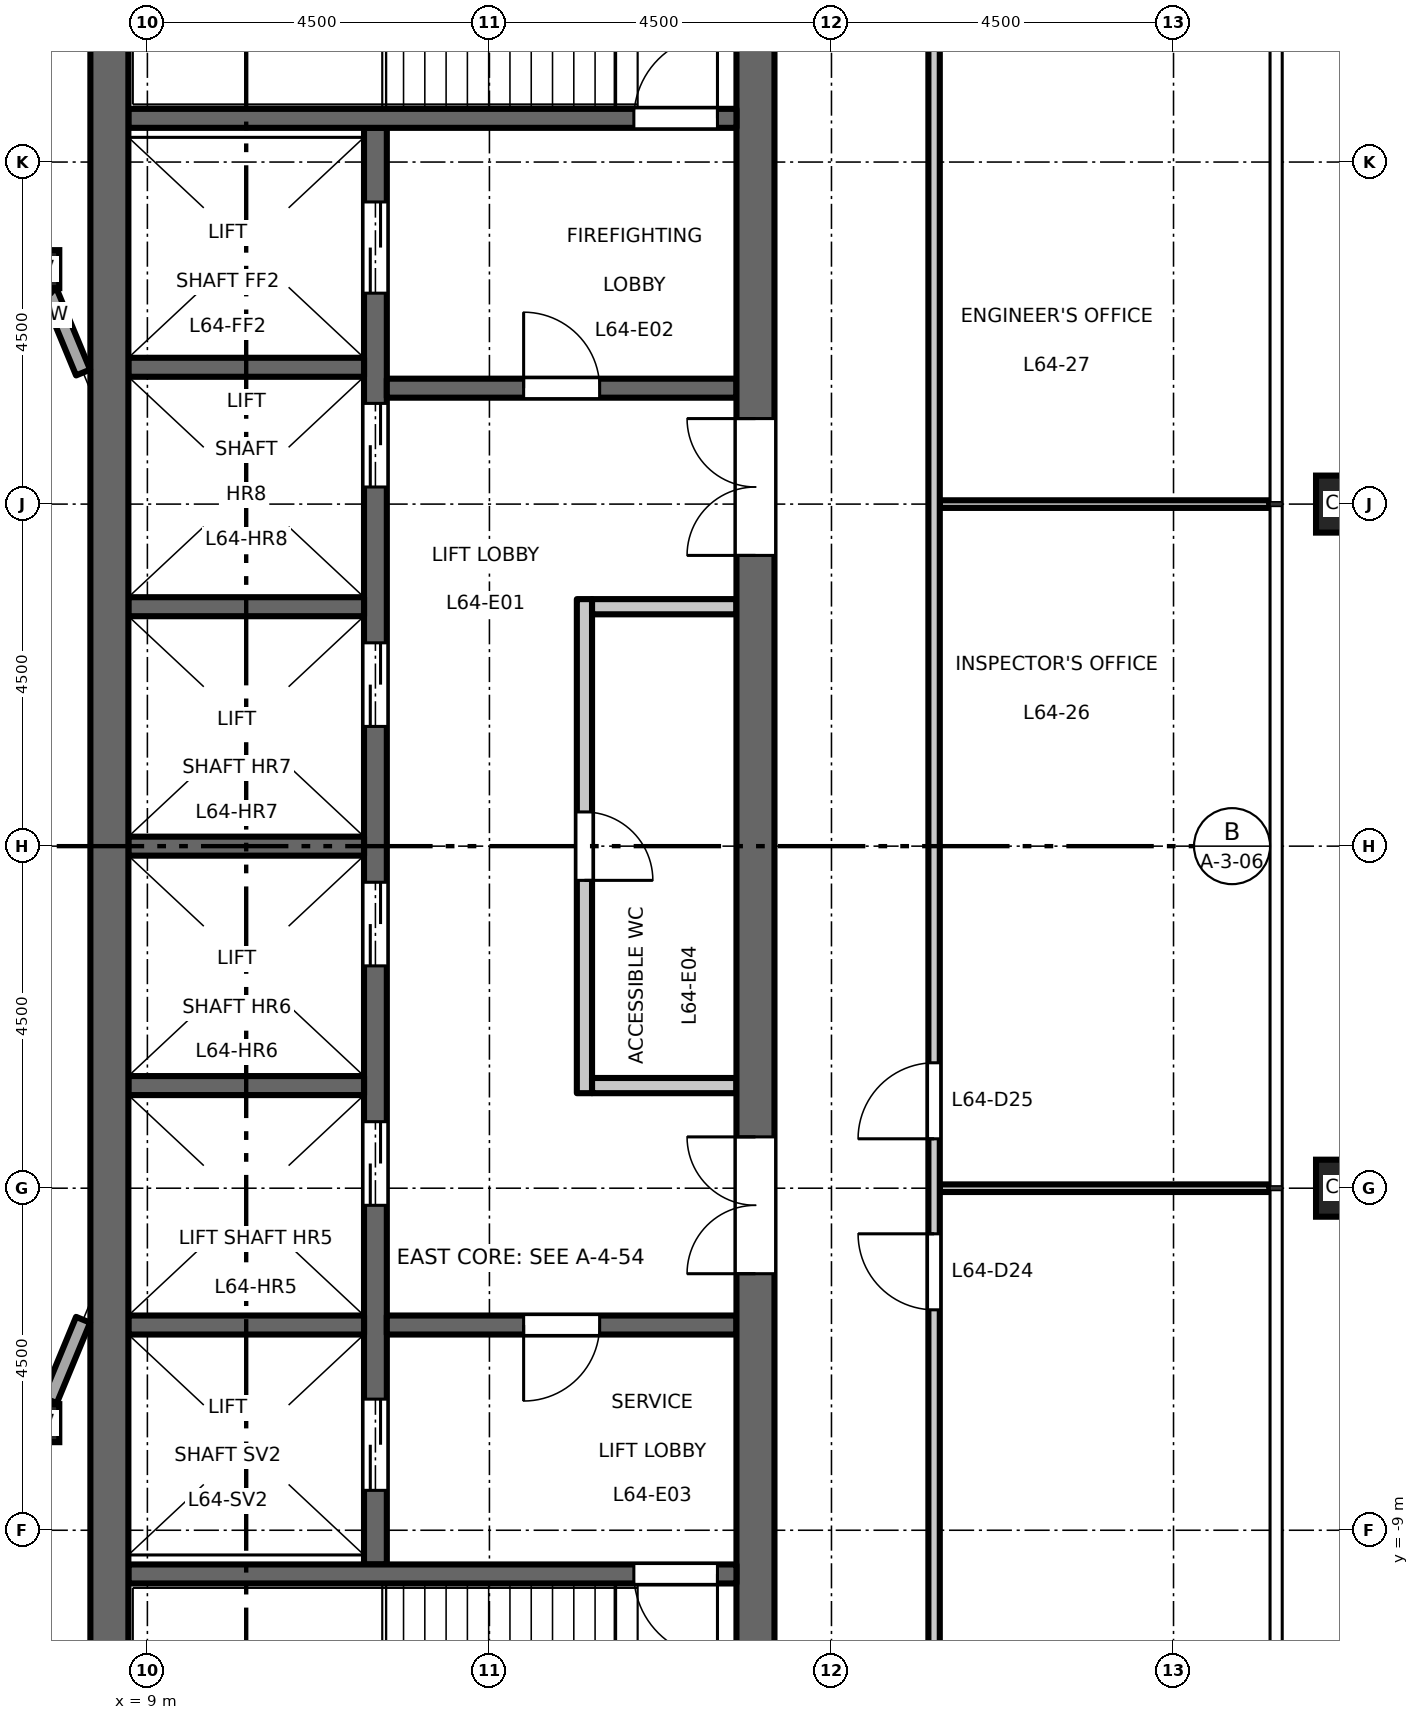
"""IFC4 building model, lengths in metres.
Left out: names, types, materials, properties, quantities, classifications, styles, units other than length and angle.
Written with IfcOpenShell. Run it as: python <this file> out.ifc"""

import sys

from ifc_helpers import new_model, si_unit, direction, frame, frame_2d, origin, origin_2d, place, context, subcontext, project, spatial, rectangle, hollow_rectangle, extrude, element, fill, save


model = new_model("IFC4")
c1 = context("Model", 3, precision=1e-05, world=origin(), true_north=direction((0.0, 1.0)))
c2 = subcontext(c1, "Body", "Model", "MODEL_VIEW")
j1 = project(units=[si_unit("LENGTHUNIT", "METRE"), si_unit("PLANEANGLEUNIT", "RADIAN")], contexts=[c1])
p1 = place(None, origin())
s1 = spatial("IfcSite", under=j1, at=p1, CompositionType="ELEMENT")
p2 = place(p1, origin())
s2 = spatial("IfcBuilding", under=s1, at=p2, CompositionType="ELEMENT")
p3 = place(p2, frame((0.0, 0.0, 298.7)))
s3 = spatial("IfcBuildingStorey", under=s2, at=p3, CompositionType="ELEMENT", Elevation=298.7)
for number, where, z_axis, x_axis in (
    (1, (24.75, -4.5, 0.0), (0.0, 0.0, 1.0), (1.0, 0.0, 0.0)),
    (2, (24.75, 4.5, 0.0), (0.0, 0.0, 1.0), (1.0, 0.0, 0.0)),
):
    element("IfcColumn", number, at=place(p3, frame(where, z_axis=z_axis, x_axis=x_axis)), inside=s3, PredefinedType="COLUMN", context=c2, shape_type="SweptSolid", body=[
        extrude(hollow_rectangle(XDim=0.75, YDim=0.75, WallThickness=0.04, at=origin_2d()), origin(), (0.0, 0.0, 1.0), 4.5),
    ])
for number, where, z_axis, x_axis in (
    (3, (7.591, -7.591, 0.0), (0.0, 0.0, 1.0), (1.0, 0.0, 0.0)),
    (4, (7.591, 7.591, 0.0), (0.0, 0.0, 1.0), (1.0, 0.0, 0.0)),
):
    element("IfcColumn", number, at=place(p3, frame(where, z_axis=z_axis, x_axis=x_axis)), inside=s3, PredefinedType="COLUMN", context=c2, shape_type="SweptSolid", body=[
        extrude(hollow_rectangle(XDim=0.5, YDim=0.5, WallThickness=0.025, at=origin_2d()), origin(), (0.0, 0.0, 1.0), 4.5),
    ])
p4 = place(p3, frame((14.75, -3.25, 0.0), z_axis=(0.0, 0.0, 1.0), x_axis=(0.0, 1.0, 0.0)))
e5 = element("IfcWall", 5, at=p4, inside=s3, PredefinedType="PARTITIONING", context=c2, shape_type="SweptSolid", body=[
    extrude(rectangle(XDim=6.5, YDim=0.2, at=frame_2d((3.25, 0.0))), origin(), (0.0, 0.0, 1.0), 4.35),
])
p5 = place(p4, frame((2.8, 0.0, 0.0)))
e6 = element("IfcOpeningElement", 6, at=p5, cuts=e5, PredefinedType="OPENING", context=c2, shape_type="SweptSolid", body=[
    extrude(rectangle(XDim=0.9, YDim=2.1, at=frame_2d((0.45, 1.05))), frame((0.0, 0.11, 0.0), z_axis=(0.0, -1.0, 0.0), x_axis=(1.0, 0.0, 0.0)), (0.0, 0.0, 1.0), 0.22),
])
for number, where, z_axis, x_axis in (
    (7, (14.85, 3.15, 0.0), (0.0, 0.0, 1.0), (1.0, 0.0, 0.0)),
    (8, (14.85, -3.15, 0.0), (0.0, 0.0, 1.0), (1.0, 0.0, 0.0)),
):
    element("IfcWall", number, at=place(p3, frame(where, z_axis=z_axis, x_axis=x_axis)), inside=s3, PredefinedType="PARTITIONING", context=c2, shape_type="SweptSolid", body=[
        extrude(rectangle(XDim=1.9, YDim=0.2, at=frame_2d((0.95, 0.0))), origin(), (0.0, 0.0, 1.0), 4.35),
    ])
p6 = place(p3, frame((12.0, -9.45, 0.0), z_axis=(0.0, 0.0, 1.0), x_axis=(0.0, 1.0, 0.0)))
e9 = element("IfcWall", 9, at=p6, inside=s3, PredefinedType="SHEAR", context=c2, shape_type="SweptSolid", body=[
    extrude(rectangle(XDim=18.9, YDim=0.3, at=frame_2d((9.45, 0.0))), origin(), (0.0, 0.0, 1.0), 4.35),
])
p7 = place(p6, frame((4.725, 0.0, 0.0)))
e10 = element("IfcOpeningElement", 10, at=p7, cuts=e9, PredefinedType="OPENING", context=c2, shape_type="SweptSolid", body=[
    extrude(rectangle(XDim=1.1, YDim=2.1, at=frame_2d((0.55, 1.05))), frame((0.0, 0.16, 0.0), z_axis=(0.0, -1.0, 0.0), x_axis=(1.0, 0.0, 0.0)), (0.0, 0.0, 1.0), 0.32),
])
p8 = place(p6, frame((7.875, 0.0, 0.0)))
e11 = element("IfcOpeningElement", 11, at=p8, cuts=e9, PredefinedType="OPENING", context=c2, shape_type="SweptSolid", body=[
    extrude(rectangle(XDim=1.1, YDim=2.1, at=frame_2d((0.55, 1.05))), frame((0.0, 0.16, 0.0), z_axis=(0.0, -1.0, 0.0), x_axis=(1.0, 0.0, 0.0)), (0.0, 0.0, 1.0), 0.32),
])
p9 = place(p6, frame((11.025, 0.0, 0.0)))
e12 = element("IfcOpeningElement", 12, at=p9, cuts=e9, PredefinedType="OPENING", context=c2, shape_type="SweptSolid", body=[
    extrude(rectangle(XDim=1.1, YDim=2.1, at=frame_2d((0.55, 1.05))), frame((0.0, 0.16, 0.0), z_axis=(0.0, -1.0, 0.0), x_axis=(1.0, 0.0, 0.0)), (0.0, 0.0, 1.0), 0.32),
])
p10 = place(p6, frame((14.175, 0.0, 0.0)))
e13 = element("IfcOpeningElement", 13, at=p10, cuts=e9, PredefinedType="OPENING", context=c2, shape_type="SweptSolid", body=[
    extrude(rectangle(XDim=1.1, YDim=2.1, at=frame_2d((0.55, 1.05))), frame((0.0, 0.16, 0.0), z_axis=(0.0, -1.0, 0.0), x_axis=(1.0, 0.0, 0.0)), (0.0, 0.0, 1.0), 0.32),
])
p11 = place(p6, frame((16.725, 0.0, 0.0)))
e14 = element("IfcOpeningElement", 14, at=p11, cuts=e9, PredefinedType="OPENING", context=c2, shape_type="SweptSolid", body=[
    extrude(rectangle(XDim=1.2, YDim=2.1, at=frame_2d((0.6, 1.05))), frame((0.0, 0.16, 0.0), z_axis=(0.0, -1.0, 0.0), x_axis=(1.0, 0.0, 0.0)), (0.0, 0.0, 1.0), 0.32),
])
p12 = place(p6, frame((0.975, 0.0, 0.0)))
e15 = element("IfcOpeningElement", 15, at=p12, cuts=e9, PredefinedType="OPENING", context=c2, shape_type="SweptSolid", body=[
    extrude(rectangle(XDim=1.2, YDim=2.1, at=frame_2d((0.6, 1.05))), frame((0.0, 0.16, 0.0), z_axis=(0.0, -1.0, 0.0), x_axis=(1.0, 0.0, 0.0)), (0.0, 0.0, 1.0), 0.32),
])
p13 = place(p3, frame((12.15, 6.025, 0.0), z_axis=(0.0, 0.0, 1.0), x_axis=(1.0, 0.0, 0.0)))
e16 = element("IfcWall", 16, at=p13, inside=s3, PredefinedType="SHEAR", context=c2, shape_type="SweptSolid", body=[
    extrude(rectangle(XDim=4.6, YDim=0.25, at=frame_2d((2.3, 0.0))), origin(), (0.0, 0.0, 1.0), 4.35),
])
p14 = place(p13, frame((1.8, 0.0, 0.0)))
e17 = element("IfcOpeningElement", 17, at=p14, cuts=e16, PredefinedType="OPENING", context=c2, shape_type="SweptSolid", body=[
    extrude(rectangle(XDim=1.0, YDim=2.1, at=frame_2d((0.5, 1.05))), frame((0.0, 0.135, 0.0), z_axis=(0.0, -1.0, 0.0), x_axis=(1.0, 0.0, 0.0)), (0.0, 0.0, 1.0), 0.27),
])
p15 = place(p3, frame((12.15, -6.3, 0.0), z_axis=(0.0, 0.0, 1.0), x_axis=(1.0, 0.0, 0.0)))
e18 = element("IfcWall", 18, at=p15, inside=s3, PredefinedType="SHEAR", context=c2, shape_type="SweptSolid", body=[
    extrude(rectangle(XDim=4.6, YDim=0.25, at=frame_2d((2.3, 0.0))), origin(), (0.0, 0.0, 1.0), 4.35),
])
p16 = place(p15, frame((1.8, 0.0, 0.0)))
e19 = element("IfcOpeningElement", 19, at=p16, cuts=e18, PredefinedType="OPENING", context=c2, shape_type="SweptSolid", body=[
    extrude(rectangle(XDim=1.0, YDim=2.1, at=frame_2d((0.5, 1.05))), frame((0.0, 0.135, 0.0), z_axis=(0.0, -1.0, 0.0), x_axis=(1.0, 0.0, 0.0)), (0.0, 0.0, 1.0), 0.27),
])
p17 = place(p3, frame((17.0, -13.0, 0.0), z_axis=(0.0, 0.0, 1.0), x_axis=(0.0, 1.0, 0.0)))
e20 = element("IfcWall", 20, at=p17, inside=s3, PredefinedType="SHEAR", context=c2, shape_type="SweptSolid", body=[
    extrude(rectangle(XDim=26.0, YDim=0.5, at=frame_2d((13.0, 0.0))), origin(), (0.0, 0.0, 1.0), 4.35),
])
p18 = place(p17, frame((16.825, 0.0, 0.0)))
e21 = element("IfcOpeningElement", 21, at=p18, cuts=e20, PredefinedType="OPENING", context=c2, shape_type="SweptSolid", body=[
    extrude(rectangle(XDim=1.8, YDim=2.1, at=frame_2d((0.9, 1.05))), frame((0.0, 0.26, 0.0), z_axis=(0.0, -1.0, 0.0), x_axis=(1.0, 0.0, 0.0)), (0.0, 0.0, 1.0), 0.52),
])
p19 = place(p17, frame((7.375, 0.0, 0.0)))
e22 = element("IfcOpeningElement", 22, at=p19, cuts=e20, PredefinedType="OPENING", context=c2, shape_type="SweptSolid", body=[
    extrude(rectangle(XDim=1.8, YDim=2.1, at=frame_2d((0.9, 1.05))), frame((0.0, 0.26, 0.0), z_axis=(0.0, -1.0, 0.0), x_axis=(1.0, 0.0, 0.0)), (0.0, 0.0, 1.0), 0.52),
])
for number, where, z_axis, x_axis in (
    (23, (8.75, 0.0, 0.0), (0.0, 0.0, 1.0), (1.0, 0.0, 0.0)),
    (24, (8.75, 3.15, 0.0), (0.0, 0.0, 1.0), (1.0, 0.0, 0.0)),
    (25, (8.75, 6.3, 0.0), (0.0, 0.0, 1.0), (1.0, 0.0, 0.0)),
    (26, (8.75, -3.15, 0.0), (0.0, 0.0, 1.0), (1.0, 0.0, 0.0)),
    (27, (8.75, -6.3, 0.0), (0.0, 0.0, 1.0), (1.0, 0.0, 0.0)),
):
    element("IfcWall", number, at=place(p3, frame(where, z_axis=z_axis, x_axis=x_axis)), inside=s3, PredefinedType="SHEAR", context=c2, shape_type="SweptSolid", body=[
        extrude(rectangle(XDim=3.1, YDim=0.25, at=frame_2d((1.55, 0.0))), origin(), (0.0, 0.0, 1.0), 4.35),
    ])
p20 = place(p3, frame((8.75, 9.575, 0.0), z_axis=(0.0, 0.0, 1.0), x_axis=(1.0, 0.0, 0.0)))
e28 = element("IfcWall", 28, at=p20, inside=s3, PredefinedType="SHEAR", context=c2, shape_type="SweptSolid", body=[
    extrude(rectangle(XDim=8.0, YDim=0.25, at=frame_2d((4.0, 0.0))), origin(), (0.0, 0.0, 1.0), 4.35),
])
p21 = place(p20, frame((6.65, 0.0, 0.0)))
e29 = element("IfcOpeningElement", 29, at=p21, cuts=e28, PredefinedType="OPENING", context=c2, shape_type="SweptSolid", body=[
    extrude(rectangle(XDim=1.1, YDim=2.1, at=frame_2d((0.55, 1.05))), frame((0.0, 0.135, 0.0), z_axis=(0.0, -1.0, 0.0), x_axis=(1.0, 0.0, 0.0)), (0.0, 0.0, 1.0), 0.27),
])
p22 = place(p3, frame((8.75, -9.575, 0.0), z_axis=(0.0, 0.0, 1.0), x_axis=(1.0, 0.0, 0.0)))
e30 = element("IfcWall", 30, at=p22, inside=s3, PredefinedType="SHEAR", context=c2, shape_type="SweptSolid", body=[
    extrude(rectangle(XDim=8.0, YDim=0.25, at=frame_2d((4.0, 0.0))), origin(), (0.0, 0.0, 1.0), 4.35),
])
p23 = place(p22, frame((6.65, 0.0, 0.0)))
e31 = element("IfcOpeningElement", 31, at=p23, cuts=e30, PredefinedType="OPENING", context=c2, shape_type="SweptSolid", body=[
    extrude(rectangle(XDim=1.1, YDim=2.1, at=frame_2d((0.55, 1.05))), frame((0.0, 0.135, 0.0), z_axis=(0.0, -1.0, 0.0), x_axis=(1.0, 0.0, 0.0)), (0.0, 0.0, 1.0), 0.27),
])
p24 = place(p3, frame((8.5, -13.0, 0.0), z_axis=(0.0, 0.0, 1.0), x_axis=(0.0, 1.0, 0.0)))
e32 = element("IfcWall", 32, at=p24, inside=s3, PredefinedType="SHEAR", context=c2, shape_type="SweptSolid", body=[
    extrude(rectangle(XDim=26.0, YDim=0.5, at=frame_2d((13.0, 0.0))), origin(), (0.0, 0.0, 1.0), 4.35),
])
for number, where, z_axis, x_axis in (
    (33, (7.716, -7.289, 0.0), (0.0, 0.0, 1.0), (0.383, 0.924, 0.0)),
    (34, (8.154, 6.231, 0.0), (0.0, 0.0, 1.0), (-0.383, 0.924, 0.0)),
):
    element("IfcWall", number, at=place(p3, frame(where, z_axis=z_axis, x_axis=x_axis)), inside=s3, PredefinedType="STANDARD", context=c2, shape_type="SweptSolid", body=[
        extrude(rectangle(XDim=1.146, YDim=0.2, at=frame_2d((0.573, 0.0))), origin(), (0.0, 0.0, 1.0), 4.01),
    ])
for number, where, z_axis, x_axis in (
    (35, (19.425, -4.5, 0.0), (0.0, 0.0, 1.0), (1.0, 0.0, 0.0)),
    (36, (19.425, 4.5, 0.0), (0.0, 0.0, 1.0), (1.0, 0.0, 0.0)),
):
    element("IfcWall", number, at=place(p3, frame(where, z_axis=z_axis, x_axis=x_axis)), inside=s3, PredefinedType="PARTITIONING", context=c2, shape_type="SweptSolid", body=[
        extrude(rectangle(XDim=4.335, YDim=0.1, at=frame_2d((2.167, 0.0))), origin(), (0.0, 0.0, 1.0), 4.35),
    ])
p25 = place(p3, frame((19.35, -16.42, 0.0), z_axis=(0.0, 0.0, 1.0), x_axis=(0.0, 1.0, 0.0)))
e37 = element("IfcWall", 37, at=p25, inside=s3, PredefinedType="PARTITIONING", context=c2, shape_type="SweptSolid", body=[
    extrude(rectangle(XDim=32.845, YDim=0.15, at=frame_2d((16.422, 0.0))), origin(), (0.0, 0.0, 1.0), 4.35),
])
p26 = place(p25, frame((10.32, 0.0, 0.0)))
e38 = element("IfcOpeningElement", 38, at=p26, cuts=e37, PredefinedType="OPENING", context=c2, shape_type="SweptSolid", body=[
    extrude(rectangle(XDim=1.0, YDim=2.1, at=frame_2d((0.5, 1.05))), frame((0.0, 0.085, 0.0), z_axis=(0.0, -1.0, 0.0), x_axis=(1.0, 0.0, 0.0)), (0.0, 0.0, 1.0), 0.17),
])
p27 = place(p25, frame((12.57, 0.0, 0.0)))
e39 = element("IfcOpeningElement", 39, at=p27, cuts=e37, PredefinedType="OPENING", context=c2, shape_type="SweptSolid", body=[
    extrude(rectangle(XDim=1.0, YDim=2.1, at=frame_2d((0.5, 1.05))), frame((0.0, 0.085, 0.0), z_axis=(0.0, -1.0, 0.0), x_axis=(1.0, 0.0, 0.0)), (0.0, 0.0, 1.0), 0.17),
])
p28 = place(p25, frame((28.32, 0.0, 0.0)))
e40 = element("IfcOpeningElement", 40, at=p28, cuts=e37, PredefinedType="OPENING", context=c2, shape_type="SweptSolid", body=[
    extrude(rectangle(XDim=1.0, YDim=2.1, at=frame_2d((0.5, 1.05))), frame((0.0, 0.085, 0.0), z_axis=(0.0, -1.0, 0.0), x_axis=(1.0, 0.0, 0.0)), (0.0, 0.0, 1.0), 0.17),
])
p29 = place(p14, origin())
e41 = element("IfcDoor", 41, at=p29, inside=s3, OperationType="SINGLE_SWING_RIGHT", PredefinedType="DOOR", context=c2, shape_type="SweptSolid", body=[
    extrude(rectangle(XDim=1.0, YDim=2.1, at=frame_2d((0.5, 1.05))), frame((0.0, 0.025, 0.0), z_axis=(0.0, -1.0, 0.0), x_axis=(1.0, 0.0, 0.0)), (0.0, 0.0, 1.0), 0.05),
])
fill(e17, e41)
p30 = place(p16, origin())
e42 = element("IfcDoor", 42, at=p30, inside=s3, OperationType="SINGLE_SWING_LEFT", PredefinedType="DOOR", context=c2, shape_type="SweptSolid", body=[
    extrude(rectangle(XDim=1.0, YDim=2.1, at=frame_2d((0.5, 1.05))), frame((0.0, 0.025, 0.0), z_axis=(0.0, -1.0, 0.0), x_axis=(1.0, 0.0, 0.0)), (0.0, 0.0, 1.0), 0.05),
])
fill(e19, e42)
p31 = place(p21, origin())
e43 = element("IfcDoor", 43, at=p31, inside=s3, OperationType="SINGLE_SWING_LEFT", PredefinedType="DOOR", context=c2, shape_type="SweptSolid", body=[
    extrude(rectangle(XDim=1.1, YDim=2.1, at=frame_2d((0.55, 1.05))), frame((0.0, 0.025, 0.0), z_axis=(0.0, -1.0, 0.0), x_axis=(1.0, 0.0, 0.0)), (0.0, 0.0, 1.0), 0.05),
])
fill(e29, e43)
p32 = place(p23, origin())
e44 = element("IfcDoor", 44, at=p32, inside=s3, OperationType="SINGLE_SWING_RIGHT", PredefinedType="DOOR", context=c2, shape_type="SweptSolid", body=[
    extrude(rectangle(XDim=1.1, YDim=2.1, at=frame_2d((0.55, 1.05))), frame((0.0, 0.025, 0.0), z_axis=(0.0, -1.0, 0.0), x_axis=(1.0, 0.0, 0.0)), (0.0, 0.0, 1.0), 0.05),
])
fill(e31, e44)
p33 = place(p18, origin())
e45 = element("IfcDoor", 45, at=p33, inside=s3, OperationType="DOUBLE_DOOR_DOUBLE_SWING", PredefinedType="DOOR", context=c2, shape_type="SweptSolid", body=[
    extrude(rectangle(XDim=1.8, YDim=2.1, at=frame_2d((0.9, 1.05))), frame((0.0, 0.025, 0.0), z_axis=(0.0, -1.0, 0.0), x_axis=(1.0, 0.0, 0.0)), (0.0, 0.0, 1.0), 0.05),
])
fill(e21, e45)
p34 = place(p19, origin())
e46 = element("IfcDoor", 46, at=p34, inside=s3, OperationType="DOUBLE_DOOR_DOUBLE_SWING", PredefinedType="DOOR", context=c2, shape_type="SweptSolid", body=[
    extrude(rectangle(XDim=1.8, YDim=2.1, at=frame_2d((0.9, 1.05))), frame((0.0, 0.025, 0.0), z_axis=(0.0, -1.0, 0.0), x_axis=(1.0, 0.0, 0.0)), (0.0, 0.0, 1.0), 0.05),
])
fill(e22, e46)
p35 = place(p7, origin())
e47 = element("IfcDoor", 47, at=p35, inside=s3, OperationType="DOUBLE_DOOR_SLIDING", PredefinedType="DOOR", context=c2, shape_type="SweptSolid", body=[
    extrude(rectangle(XDim=1.1, YDim=2.1, at=frame_2d((0.55, 1.05))), frame((0.0, 0.025, 0.0), z_axis=(0.0, -1.0, 0.0), x_axis=(1.0, 0.0, 0.0)), (0.0, 0.0, 1.0), 0.05),
])
fill(e10, e47)
p36 = place(p8, origin())
e48 = element("IfcDoor", 48, at=p36, inside=s3, OperationType="DOUBLE_DOOR_SLIDING", PredefinedType="DOOR", context=c2, shape_type="SweptSolid", body=[
    extrude(rectangle(XDim=1.1, YDim=2.1, at=frame_2d((0.55, 1.05))), frame((0.0, 0.025, 0.0), z_axis=(0.0, -1.0, 0.0), x_axis=(1.0, 0.0, 0.0)), (0.0, 0.0, 1.0), 0.05),
])
fill(e11, e48)
p37 = place(p9, origin())
e49 = element("IfcDoor", 49, at=p37, inside=s3, OperationType="DOUBLE_DOOR_SLIDING", PredefinedType="DOOR", context=c2, shape_type="SweptSolid", body=[
    extrude(rectangle(XDim=1.1, YDim=2.1, at=frame_2d((0.55, 1.05))), frame((0.0, 0.025, 0.0), z_axis=(0.0, -1.0, 0.0), x_axis=(1.0, 0.0, 0.0)), (0.0, 0.0, 1.0), 0.05),
])
fill(e12, e49)
p38 = place(p10, origin())
e50 = element("IfcDoor", 50, at=p38, inside=s3, OperationType="DOUBLE_DOOR_SLIDING", PredefinedType="DOOR", context=c2, shape_type="SweptSolid", body=[
    extrude(rectangle(XDim=1.1, YDim=2.1, at=frame_2d((0.55, 1.05))), frame((0.0, 0.025, 0.0), z_axis=(0.0, -1.0, 0.0), x_axis=(1.0, 0.0, 0.0)), (0.0, 0.0, 1.0), 0.05),
])
fill(e13, e50)
p39 = place(p11, origin())
e51 = element("IfcDoor", 51, at=p39, inside=s3, OperationType="DOUBLE_DOOR_SLIDING", PredefinedType="DOOR", context=c2, shape_type="SweptSolid", body=[
    extrude(rectangle(XDim=1.2, YDim=2.1, at=frame_2d((0.6, 1.05))), frame((0.0, 0.025, 0.0), z_axis=(0.0, -1.0, 0.0), x_axis=(1.0, 0.0, 0.0)), (0.0, 0.0, 1.0), 0.05),
])
fill(e14, e51)
p40 = place(p12, origin())
e52 = element("IfcDoor", 52, at=p40, inside=s3, OperationType="DOUBLE_DOOR_SLIDING", PredefinedType="DOOR", context=c2, shape_type="SweptSolid", body=[
    extrude(rectangle(XDim=1.2, YDim=2.1, at=frame_2d((0.6, 1.05))), frame((0.0, 0.025, 0.0), z_axis=(0.0, -1.0, 0.0), x_axis=(1.0, 0.0, 0.0)), (0.0, 0.0, 1.0), 0.05),
])
fill(e15, e52)
p41 = place(p5, origin())
e53 = element("IfcDoor", 53, at=p41, inside=s3, OperationType="SINGLE_SWING_LEFT", PredefinedType="DOOR", context=c2, shape_type="SweptSolid", body=[
    extrude(rectangle(XDim=0.9, YDim=2.1, at=frame_2d((0.45, 1.05))), frame((0.0, 0.025, 0.0), z_axis=(0.0, -1.0, 0.0), x_axis=(1.0, 0.0, 0.0)), (0.0, 0.0, 1.0), 0.05),
])
fill(e6, e53)
p42 = place(p26, origin())
e54 = element("IfcDoor", 54, at=p42, inside=s3, OperationType="SINGLE_SWING_RIGHT", PredefinedType="DOOR", context=c2, shape_type="SweptSolid", body=[
    extrude(rectangle(XDim=1.0, YDim=2.1, at=frame_2d((0.5, 1.05))), frame((0.0, 0.025, 0.0), z_axis=(0.0, -1.0, 0.0), x_axis=(1.0, 0.0, 0.0)), (0.0, 0.0, 1.0), 0.05),
])
fill(e38, e54)
p43 = place(p27, origin())
e55 = element("IfcDoor", 55, at=p43, inside=s3, OperationType="SINGLE_SWING_LEFT", PredefinedType="DOOR", context=c2, shape_type="SweptSolid", body=[
    extrude(rectangle(XDim=1.0, YDim=2.1, at=frame_2d((0.5, 1.05))), frame((0.0, 0.025, 0.0), z_axis=(0.0, -1.0, 0.0), x_axis=(1.0, 0.0, 0.0)), (0.0, 0.0, 1.0), 0.05),
])
fill(e39, e55)
save(model, sys.argv[1])
